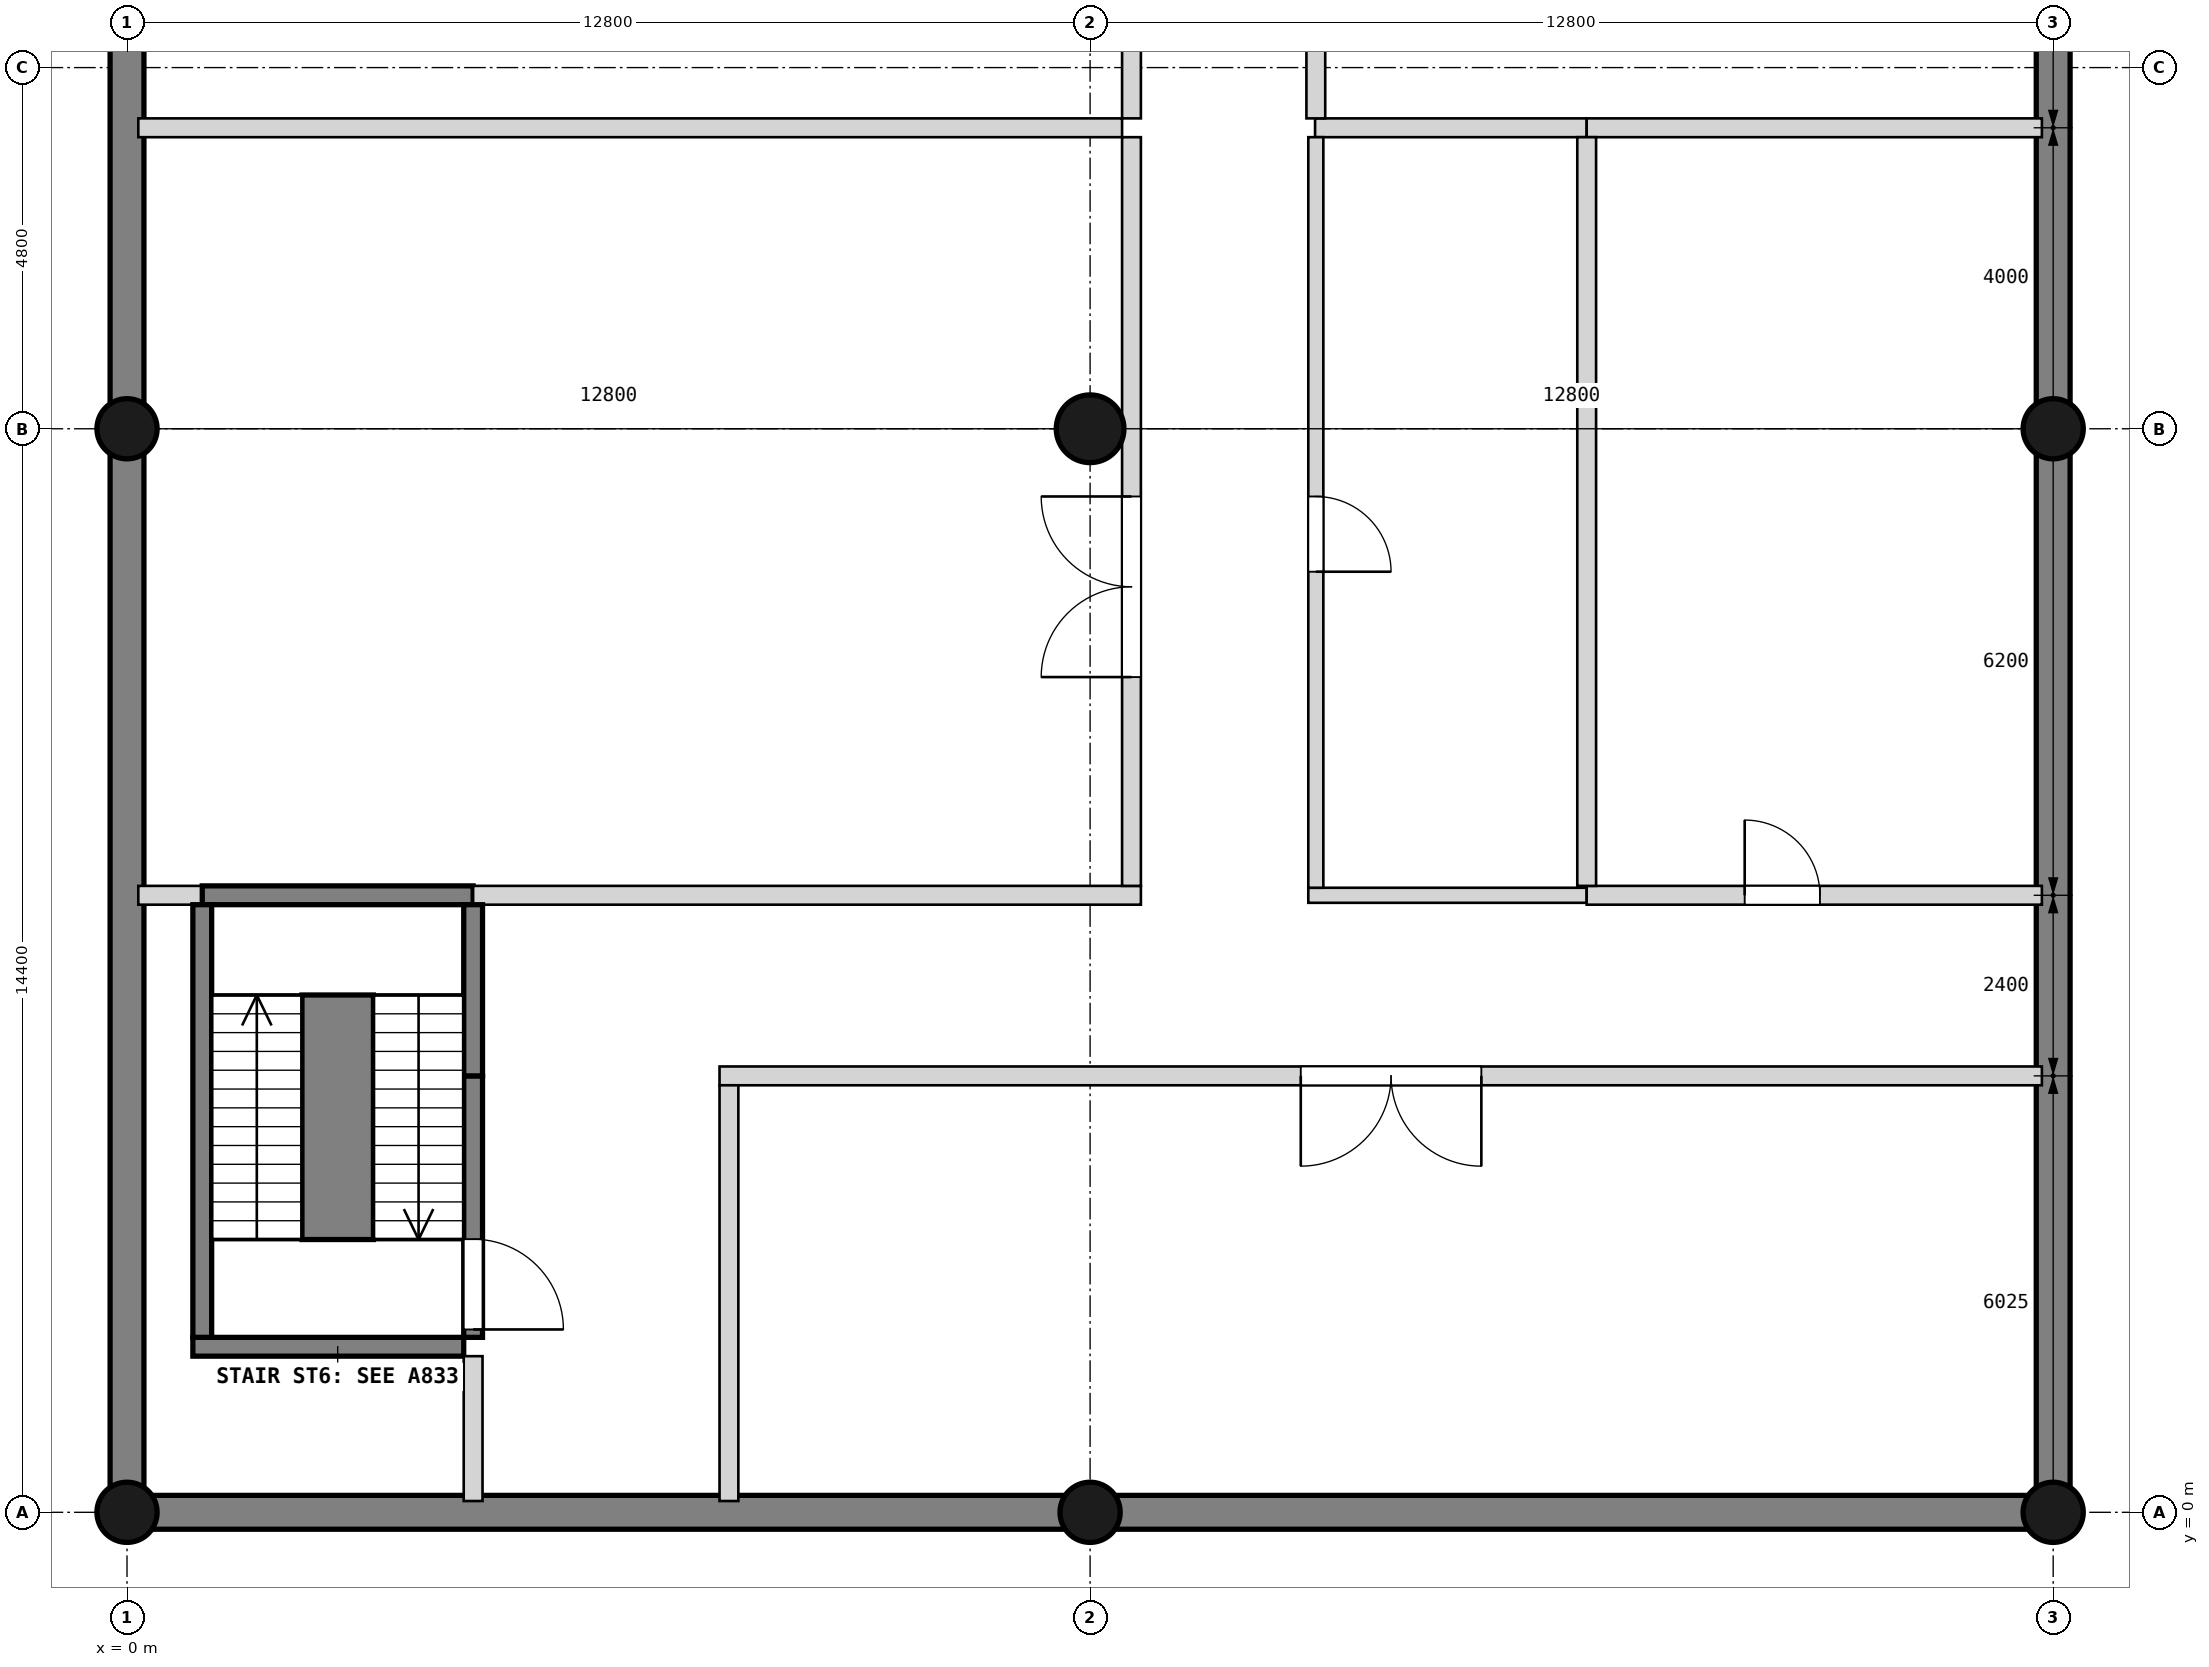
"""IFC4 building model, lengths in metres.
Left out: names, types, materials, properties, quantities, classifications, styles, units other than length and angle.
Written with IfcOpenShell. Run it as: python <this file> out.ifc"""

import sys

from ifc_helpers import new_model, si_unit, direction, frame, frame_2d, origin, origin_2d, place, context, subcontext, project, spatial, rectangle, circle, extrude, element, fill, save


model = new_model("IFC4")
c1 = context("Model", 3, precision=1e-05, world=origin(), true_north=direction((0.0, 1.0)))
c2 = subcontext(c1, "Body", "Model", "MODEL_VIEW")
j1 = project(units=[si_unit("LENGTHUNIT", "METRE"), si_unit("PLANEANGLEUNIT", "RADIAN")], contexts=[c1])
p1 = place(None, origin())
s1 = spatial("IfcSite", under=j1, at=p1, CompositionType="ELEMENT")
p2 = place(p1, origin())
s2 = spatial("IfcBuilding", under=s1, at=p2, CompositionType="ELEMENT")
p3 = place(p2, frame((0.0, 0.0, -4.8)))
s3 = spatial("IfcBuildingStorey", under=s2, at=p3, CompositionType="ELEMENT", Elevation=-4.8)
p4 = place(p3, frame((0.0, -0.225, 0.0), z_axis=(0.0, 0.0, 1.0), x_axis=(0.0, 1.0, 0.0)))
e1 = element("IfcWall", 1, at=p4, inside=s3, PredefinedType="SOLIDWALL", context=c2, shape_type="SweptSolid", body=[
    extrude(rectangle(XDim=58.05, YDim=0.45, at=frame_2d((29.025, 0.0))), origin(), (0.0, 0.0, 1.0), 4.8),
])
p5 = place(p3, frame((0.225, 0.0, 0.0), z_axis=(0.0, 0.0, 1.0), x_axis=(1.0, 0.0, 0.0)))
e2 = element("IfcWall", 2, at=p5, inside=s3, PredefinedType="SOLIDWALL", context=c2, shape_type="SweptSolid", body=[
    extrude(rectangle(XDim=25.15, YDim=0.45, at=frame_2d((12.575, 0.0))), origin(), (0.0, 0.0, 1.0), 4.8),
])
p6 = place(p3, frame((25.6, -0.225, 0.0), z_axis=(0.0, 0.0, 1.0), x_axis=(0.0, 1.0, 0.0)))
e3 = element("IfcWall", 3, at=p6, inside=s3, PredefinedType="SOLIDWALL", context=c2, shape_type="SweptSolid", body=[
    extrude(rectangle(XDim=33.6, YDim=0.45, at=frame_2d((16.8, 0.0))), origin(), (0.0, 0.0, 1.0), 4.8),
])
for number, where, z_axis, x_axis in (
    (4, (0.0, 0.0, 0.0), (0.0, 0.0, 1.0), (1.0, 0.0, 0.0)),
    (5, (0.0, 14.4, 0.0), (0.0, 0.0, 1.0), (1.0, 0.0, 0.0)),
    (6, (12.8, 0.0, 0.0), (0.0, 0.0, 1.0), (1.0, 0.0, 0.0)),
):
    element("IfcColumn", number, at=place(p3, frame(where, z_axis=z_axis, x_axis=x_axis)), inside=s3, PredefinedType="COLUMN", context=c2, shape_type="SweptSolid", body=[
        extrude(circle(Radius=0.4, at=origin_2d()), origin(), (0.0, 0.0, 1.0), 4.8),
    ])
p7 = place(p3, frame((12.8, 14.4, 0.0), z_axis=(0.0, 0.0, 1.0), x_axis=(1.0, 0.0, 0.0)))
e7 = element("IfcColumn", 7, at=p7, inside=s3, PredefinedType="COLUMN", context=c2, shape_type="SweptSolid", body=[
    extrude(circle(Radius=0.45, at=origin_2d()), origin(), (0.0, 0.0, 1.0), 4.8),
])
for number, where, z_axis, x_axis in (
    (8, (25.6, 0.0, 0.0), (0.0, 0.0, 1.0), (1.0, 0.0, 0.0)),
    (9, (25.6, 14.4, 0.0), (0.0, 0.0, 1.0), (1.0, 0.0, 0.0)),
):
    element("IfcColumn", number, at=place(p3, frame(where, z_axis=z_axis, x_axis=x_axis)), inside=s3, PredefinedType="COLUMN", context=c2, shape_type="SweptSolid", body=[
        extrude(circle(Radius=0.4, at=origin_2d()), origin(), (0.0, 0.0, 1.0), 4.8),
    ])
p8 = place(p3, frame((0.875, 2.2, 0.0), z_axis=(0.0, 0.0, 1.0), x_axis=(1.0, 0.0, 0.0)))
e10 = element("IfcWall", 10, at=p8, inside=s3, PredefinedType="SHEAR", context=c2, shape_type="SweptSolid", body=[
    extrude(rectangle(XDim=3.6, YDim=0.25, at=frame_2d((1.8, 0.0))), origin(), (0.0, 0.0, 1.0), 4.5),
])
p9 = place(p3, frame((7.875, 5.8, 0.0), z_axis=(0.0, 0.0, 1.0), x_axis=(1.0, 0.0, 0.0)))
e11 = element("IfcWall", 11, at=p9, inside=s3, PredefinedType="PARTITIONING", context=c2, shape_type="SweptSolid", body=[
    extrude(rectangle(XDim=17.575, YDim=0.25, at=frame_2d((8.788, 0.0))), origin(), (0.0, 0.0, 1.0), 4.5),
])
p10 = place(p9, frame((7.725, 0.0, 0.0)))
e12 = element("IfcOpeningElement", 12, at=p10, cuts=e11, PredefinedType="OPENING", context=c2, shape_type="SweptSolid", body=[
    extrude(rectangle(XDim=2.4, YDim=2.1, at=frame_2d((1.2, 1.05))), frame((0.0, 0.135, 0.0), z_axis=(0.0, -1.0, 0.0), x_axis=(1.0, 0.0, 0.0)), (0.0, 0.0, 1.0), 0.27),
])
p11 = place(p3, frame((0.15, 8.2, 0.0), z_axis=(0.0, 0.0, 1.0), x_axis=(1.0, 0.0, 0.0)))
e13 = element("IfcWall", 13, at=p11, inside=s3, PredefinedType="PARTITIONING", context=c2, shape_type="SweptSolid", body=[
    extrude(rectangle(XDim=0.85, YDim=0.25, at=frame_2d((0.425, 0.0))), origin(), (0.0, 0.0, 1.0), 4.5),
])
p12 = place(p3, frame((1.0, 8.2, 0.0), z_axis=(0.0, 0.0, 1.0), x_axis=(1.0, 0.0, 0.0)))
e14 = element("IfcWall", 14, at=p12, inside=s3, PredefinedType="SHEAR", context=c2, shape_type="SweptSolid", body=[
    extrude(rectangle(XDim=3.6, YDim=0.25, at=frame_2d((1.8, 0.0))), origin(), (0.0, 0.0, 1.0), 4.5),
])
p13 = place(p3, frame((4.6, 8.2, 0.0), z_axis=(0.0, 0.0, 1.0), x_axis=(1.0, 0.0, 0.0)))
e15 = element("IfcWall", 15, at=p13, inside=s3, PredefinedType="PARTITIONING", context=c2, shape_type="SweptSolid", body=[
    extrude(rectangle(XDim=8.875, YDim=0.25, at=frame_2d((4.438, 0.0))), origin(), (0.0, 0.0, 1.0), 4.5),
])
p14 = place(p3, frame((15.7, 8.2, 0.0), z_axis=(0.0, 0.0, 1.0), x_axis=(1.0, 0.0, 0.0)))
e16 = element("IfcWall", 16, at=p14, inside=s3, PredefinedType="PARTITIONING", context=c2, shape_type="SweptSolid", body=[
    extrude(rectangle(XDim=3.7, YDim=0.2, at=frame_2d((1.85, 0.0))), origin(), (0.0, 0.0, 1.0), 4.5),
])
p15 = place(p3, frame((19.4, 8.2, 0.0), z_axis=(0.0, 0.0, 1.0), x_axis=(1.0, 0.0, 0.0)))
e17 = element("IfcWall", 17, at=p15, inside=s3, PredefinedType="PARTITIONING", context=c2, shape_type="SweptSolid", body=[
    extrude(rectangle(XDim=6.05, YDim=0.25, at=frame_2d((3.025, 0.0))), origin(), (0.0, 0.0, 1.0), 4.5),
])
p16 = place(p15, frame((2.1, 0.0, 0.0)))
e18 = element("IfcOpeningElement", 18, at=p16, cuts=e17, PredefinedType="OPENING", context=c2, shape_type="SweptSolid", body=[
    extrude(rectangle(XDim=1.0, YDim=2.1, at=frame_2d((0.5, 1.05))), frame((0.0, 0.135, 0.0), z_axis=(0.0, -1.0, 0.0), x_axis=(1.0, 0.0, 0.0)), (0.0, 0.0, 1.0), 0.27),
])
p17 = place(p3, frame((0.15, 18.4, 0.0), z_axis=(0.0, 0.0, 1.0), x_axis=(1.0, 0.0, 0.0)))
e19 = element("IfcWall", 19, at=p17, inside=s3, PredefinedType="PARTITIONING", context=c2, shape_type="SweptSolid", body=[
    extrude(rectangle(XDim=13.075, YDim=0.25, at=frame_2d((6.538, 0.0))), origin(), (0.0, 0.0, 1.0), 4.5),
])
p18 = place(p3, frame((15.79, 18.4, 0.0), z_axis=(0.0, 0.0, 1.0), x_axis=(1.0, 0.0, 0.0)))
e20 = element("IfcWall", 20, at=p18, inside=s3, PredefinedType="PARTITIONING", context=c2, shape_type="SweptSolid", body=[
    extrude(rectangle(XDim=3.61, YDim=0.25, at=frame_2d((1.805, 0.0))), origin(), (0.0, 0.0, 1.0), 4.5),
])
p19 = place(p3, frame((19.4, 18.4, 0.0), z_axis=(0.0, 0.0, 1.0), x_axis=(1.0, 0.0, 0.0)))
e21 = element("IfcWall", 21, at=p19, inside=s3, PredefinedType="PARTITIONING", context=c2, shape_type="SweptSolid", body=[
    extrude(rectangle(XDim=6.05, YDim=0.25, at=frame_2d((3.025, 0.0))), origin(), (0.0, 0.0, 1.0), 4.5),
])
p20 = place(p3, frame((1.0, 2.325, 0.0), z_axis=(0.0, 0.0, 1.0), x_axis=(0.0, 1.0, 0.0)))
e22 = element("IfcWall", 22, at=p20, inside=s3, PredefinedType="SHEAR", context=c2, shape_type="SweptSolid", body=[
    extrude(rectangle(XDim=5.75, YDim=0.25, at=frame_2d((2.875, 0.0))), origin(), (0.0, 0.0, 1.0), 4.5),
])
p21 = place(p3, frame((4.6, 0.15, 0.0), z_axis=(0.0, 0.0, 1.0), x_axis=(0.0, 1.0, 0.0)))
e23 = element("IfcWall", 23, at=p21, inside=s3, PredefinedType="PARTITIONING", context=c2, shape_type="SweptSolid", body=[
    extrude(rectangle(XDim=1.925, YDim=0.25, at=frame_2d((0.962, 0.0))), origin(), (0.0, 0.0, 1.0), 4.5),
])
p22 = place(p3, frame((4.6, 2.325, 0.0), z_axis=(0.0, 0.0, 1.0), x_axis=(0.0, 1.0, 0.0)))
e24 = element("IfcWall", 24, at=p22, inside=s3, PredefinedType="SHEAR", context=c2, shape_type="SweptSolid", body=[
    extrude(rectangle(XDim=3.475, YDim=0.25, at=frame_2d((1.738, 0.0))), origin(), (0.0, 0.0, 1.0), 4.5),
])
p23 = place(p22, frame((0.105, 0.0, 0.0)))
e25 = element("IfcOpeningElement", 25, at=p23, cuts=e24, PredefinedType="OPENING", context=c2, shape_type="SweptSolid", body=[
    extrude(rectangle(XDim=1.2, YDim=2.1, at=frame_2d((0.6, 1.05))), frame((0.0, 0.135, 0.0), z_axis=(0.0, -1.0, 0.0), x_axis=(1.0, 0.0, 0.0)), (0.0, 0.0, 1.0), 0.27),
])
p24 = place(p3, frame((4.6, 5.8, 0.0), z_axis=(0.0, 0.0, 1.0), x_axis=(0.0, 1.0, 0.0)))
e26 = element("IfcWall", 26, at=p24, inside=s3, PredefinedType="SHEAR", context=c2, shape_type="SweptSolid", body=[
    extrude(rectangle(XDim=2.275, YDim=0.25, at=frame_2d((1.137, 0.0))), origin(), (0.0, 0.0, 1.0), 4.5),
])
p25 = place(p3, frame((8.0, 0.15, 0.0), z_axis=(0.0, 0.0, 1.0), x_axis=(0.0, 1.0, 0.0)))
e27 = element("IfcWall", 27, at=p25, inside=s3, PredefinedType="PARTITIONING", context=c2, shape_type="SweptSolid", body=[
    extrude(rectangle(XDim=5.525, YDim=0.25, at=frame_2d((2.763, 0.0))), origin(), (0.0, 0.0, 1.0), 4.5),
])
p26 = place(p3, frame((13.35, 8.325, 0.0), z_axis=(0.0, 0.0, 1.0), x_axis=(0.0, 1.0, 0.0)))
e28 = element("IfcWall", 28, at=p26, inside=s3, PredefinedType="PARTITIONING", context=c2, shape_type="SweptSolid", body=[
    extrude(rectangle(XDim=9.95, YDim=0.25, at=frame_2d((4.975, 0.0))), origin(), (0.0, 0.0, 1.0), 4.5),
])
p27 = place(p26, frame((2.775, 0.0, 0.0)))
e29 = element("IfcOpeningElement", 29, at=p27, cuts=e28, PredefinedType="OPENING", context=c2, shape_type="SweptSolid", body=[
    extrude(rectangle(XDim=2.4, YDim=2.1, at=frame_2d((1.2, 1.05))), frame((0.0, 0.135, 0.0), z_axis=(0.0, -1.0, 0.0), x_axis=(1.0, 0.0, 0.0)), (0.0, 0.0, 1.0), 0.27),
])
p28 = place(p3, frame((13.35, 18.525, 0.0), z_axis=(0.0, 0.0, 1.0), x_axis=(0.0, 1.0, 0.0)))
e30 = element("IfcWall", 30, at=p28, inside=s3, PredefinedType="PARTITIONING", context=c2, shape_type="SweptSolid", body=[
    extrude(rectangle(XDim=10.275, YDim=0.25, at=frame_2d((5.138, 0.0))), origin(), (0.0, 0.0, 1.0), 4.5),
])
p29 = place(p28, frame((3.875, 0.0, 0.0)))
e31 = element("IfcOpeningElement", 31, at=p29, cuts=e30, PredefinedType="OPENING", context=c2, shape_type="SweptSolid", body=[
    extrude(rectangle(XDim=2.4, YDim=2.1, at=frame_2d((1.2, 1.05))), frame((0.0, 0.135, 0.0), z_axis=(0.0, -1.0, 0.0), x_axis=(1.0, 0.0, 0.0)), (0.0, 0.0, 1.0), 0.27),
])
p30 = place(p3, frame((15.8, 8.3, 0.0), z_axis=(0.0, 0.0, 1.0), x_axis=(0.0, 1.0, 0.0)))
e32 = element("IfcWall", 32, at=p30, inside=s3, PredefinedType="PARTITIONING", context=c2, shape_type="SweptSolid", body=[
    extrude(rectangle(XDim=9.975, YDim=0.2, at=frame_2d((4.987, 0.0))), origin(), (0.0, 0.0, 1.0), 4.5),
])
p31 = place(p30, frame((4.2, 0.0, 0.0)))
e33 = element("IfcOpeningElement", 33, at=p31, cuts=e32, PredefinedType="OPENING", context=c2, shape_type="SweptSolid", body=[
    extrude(rectangle(XDim=1.0, YDim=2.1, at=frame_2d((0.5, 1.05))), frame((0.0, 0.11, 0.0), z_axis=(0.0, -1.0, 0.0), x_axis=(1.0, 0.0, 0.0)), (0.0, 0.0, 1.0), 0.22),
])
p32 = place(p3, frame((15.8, 18.525, 0.0), z_axis=(0.0, 0.0, 1.0), x_axis=(0.0, 1.0, 0.0)))
e34 = element("IfcWall", 34, at=p32, inside=s3, PredefinedType="PARTITIONING", context=c2, shape_type="SweptSolid", body=[
    extrude(rectangle(XDim=10.15, YDim=0.25, at=frame_2d((5.075, 0.0))), origin(), (0.0, 0.0, 1.0), 4.5),
])
p33 = place(p32, frame((3.875, 0.0, 0.0)))
e35 = element("IfcOpeningElement", 35, at=p33, cuts=e34, PredefinedType="OPENING", context=c2, shape_type="SweptSolid", body=[
    extrude(rectangle(XDim=2.4, YDim=2.1, at=frame_2d((1.2, 1.05))), frame((0.0, 0.135, 0.0), z_axis=(0.0, -1.0, 0.0), x_axis=(1.0, 0.0, 0.0)), (0.0, 0.0, 1.0), 0.27),
])
p34 = place(p3, frame((19.4, 8.325, 0.0), z_axis=(0.0, 0.0, 1.0), x_axis=(0.0, 1.0, 0.0)))
e36 = element("IfcWall", 36, at=p34, inside=s3, PredefinedType="PARTITIONING", context=c2, shape_type="SweptSolid", body=[
    extrude(rectangle(XDim=9.95, YDim=0.25, at=frame_2d((4.975, 0.0))), origin(), (0.0, 0.0, 1.0), 3.6),
])
p35 = place(p3, frame((2.8, 3.625, 0.0), z_axis=(0.0, 0.0, 1.0), x_axis=(0.0, 1.0, 0.0)))
e37 = element("IfcWall", 37, at=p35, inside=s3, PredefinedType="SHEAR", context=c2, shape_type="SweptSolid", body=[
    extrude(rectangle(XDim=3.25, YDim=0.95, at=frame_2d((1.625, 0.0))), origin(), (0.0, 0.0, 1.0), 4.8),
])
p36 = place(p23, frame((1.2, 0.0, 0.0), z_axis=(0.0, 0.0, 1.0), x_axis=(-1.0, 0.0, 0.0)))
e38 = element("IfcDoor", 38, at=p36, inside=s3, OperationType="SINGLE_SWING_RIGHT", PredefinedType="DOOR", context=c2, shape_type="SweptSolid", body=[
    extrude(rectangle(XDim=1.2, YDim=2.1, at=frame_2d((0.6, 1.05))), frame((0.0, 0.025, 0.0), z_axis=(0.0, -1.0, 0.0), x_axis=(1.0, 0.0, 0.0)), (0.0, 0.0, 1.0), 0.05),
])
fill(e25, e38)
p37 = place(p10, frame((2.4, 0.0, 0.0), z_axis=(0.0, 0.0, 1.0), x_axis=(-1.0, 0.0, 0.0)))
e39 = element("IfcDoor", 39, at=p37, inside=s3, OperationType="DOUBLE_DOOR_SINGLE_SWING", PredefinedType="DOOR", context=c2, shape_type="SweptSolid", body=[
    extrude(rectangle(XDim=2.4, YDim=2.1, at=frame_2d((1.2, 1.05))), frame((0.0, 0.025, 0.0), z_axis=(0.0, -1.0, 0.0), x_axis=(1.0, 0.0, 0.0)), (0.0, 0.0, 1.0), 0.05),
])
fill(e12, e39)
p38 = place(p27, origin())
e40 = element("IfcDoor", 40, at=p38, inside=s3, OperationType="DOUBLE_DOOR_SINGLE_SWING", PredefinedType="DOOR", context=c2, shape_type="SweptSolid", body=[
    extrude(rectangle(XDim=2.4, YDim=2.1, at=frame_2d((1.2, 1.05))), frame((0.0, 0.025, 0.0), z_axis=(0.0, -1.0, 0.0), x_axis=(1.0, 0.0, 0.0)), (0.0, 0.0, 1.0), 0.05),
])
fill(e29, e40)
p39 = place(p31, frame((1.0, 0.0, 0.0), z_axis=(0.0, 0.0, 1.0), x_axis=(-1.0, 0.0, 0.0)))
e41 = element("IfcDoor", 41, at=p39, inside=s3, OperationType="SINGLE_SWING_RIGHT", PredefinedType="DOOR", context=c2, shape_type="SweptSolid", body=[
    extrude(rectangle(XDim=1.0, YDim=2.1, at=frame_2d((0.5, 1.05))), frame((0.0, 0.025, 0.0), z_axis=(0.0, -1.0, 0.0), x_axis=(1.0, 0.0, 0.0)), (0.0, 0.0, 1.0), 0.05),
])
fill(e33, e41)
p40 = place(p16, origin())
e42 = element("IfcDoor", 42, at=p40, inside=s3, OperationType="SINGLE_SWING_LEFT", PredefinedType="DOOR", context=c2, shape_type="SweptSolid", body=[
    extrude(rectangle(XDim=1.0, YDim=2.1, at=frame_2d((0.5, 1.05))), frame((0.0, 0.025, 0.0), z_axis=(0.0, -1.0, 0.0), x_axis=(1.0, 0.0, 0.0)), (0.0, 0.0, 1.0), 0.05),
])
fill(e18, e42)
save(model, sys.argv[1])
